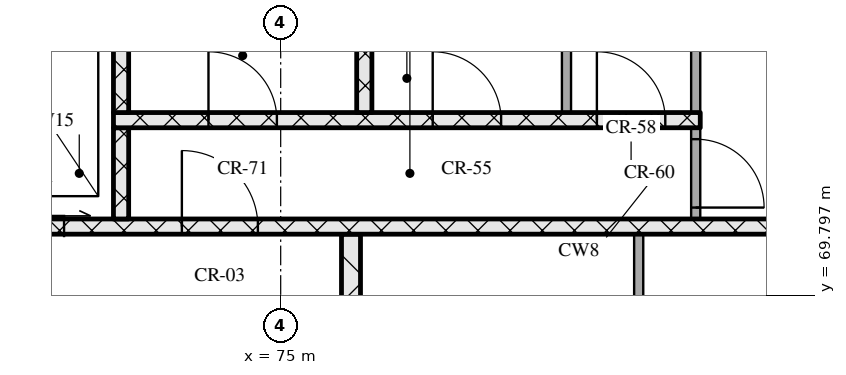
"""IFC4 building model, lengths in metres.
Left out: names, types, materials, properties, quantities, classifications, styles, units other than length and angle.
Written with IfcOpenShell. Run it as: python <this file> out.ifc"""

import sys

from ifc_helpers import new_model, si_unit, direction, frame, frame_2d, origin, place, context, subcontext, project, spatial, rectangle, extrude, element, fill, save


model = new_model("IFC4")
c1 = context("Model", 3, precision=1e-05, world=origin(), true_north=direction((0.0, 1.0)))
c2 = subcontext(c1, "Body", "Model", "MODEL_VIEW")
j1 = project(units=[si_unit("LENGTHUNIT", "METRE"), si_unit("PLANEANGLEUNIT", "RADIAN")], contexts=[c1])
p1 = place(None, origin())
s1 = spatial("IfcSite", under=j1, at=p1, CompositionType="ELEMENT")
p2 = place(p1, origin())
s2 = spatial("IfcBuilding", under=s1, at=p2, CompositionType="ELEMENT")
p3 = place(p2, frame((0.0, 0.0, 172.65)))
s3 = spatial("IfcBuildingStorey", under=s2, at=p3, CompositionType="ELEMENT", Elevation=172.65)
p4 = place(p3, frame((79.71, 68.0, 0.0), z_axis=(0.0, 0.0, 1.0), x_axis=(0.0, 1.0, 0.0)))
e1 = element("IfcWall", 1, at=p4, inside=s3, PredefinedType="PARTITIONING", context=c2, shape_type="SweptSolid", body=[
    extrude(rectangle(XDim=2.6, YDim=0.12, at=frame_2d((1.3, 0.0))), origin(), (0.0, 0.0, 1.0), 3.32),
])
p5 = place(p3, frame((75.925, 68.3, 0.0), z_axis=(0.0, 0.0, 1.0), x_axis=(0.0, 1.0, 0.0)))
e2 = element("IfcWall", 2, at=p5, inside=s3, PredefinedType="SOLIDWALL", context=c2, shape_type="SweptSolid", body=[
    extrude(rectangle(XDim=2.3, YDim=0.25, at=frame_2d((1.15, 0.0))), origin(), (0.0, 0.0, 1.0), 3.32),
])
p6 = place(p3, frame((67.8, 70.7, 0.0), z_axis=(0.0, 0.0, 1.0), x_axis=(1.0, 0.0, 0.0)))
e3 = element("IfcWall", 3, at=p6, inside=s3, PredefinedType="SOLIDWALL", context=c2, shape_type="SweptSolid", body=[
    extrude(rectangle(XDim=39.6, YDim=0.2, at=frame_2d((19.8, 0.0))), origin(), (0.0, 0.0, 1.0), 3.32),
])
p7 = place(p6, frame((0.65, 0.0, 0.0)))
e4 = element("IfcOpeningElement", 4, at=p7, cuts=e3, PredefinedType="OPENING", context=c2, shape_type="SweptSolid", body=[
    extrude(rectangle(XDim=1.1, YDim=2.1, at=frame_2d((0.55, 1.05))), frame((0.0, 0.11, 0.0), z_axis=(0.0, -1.0, 0.0), x_axis=(1.0, 0.0, 0.0)), (0.0, 0.0, 1.0), 0.22),
])
p8 = place(p6, frame((3.25, 0.0, 0.0)))
e5 = element("IfcOpeningElement", 5, at=p8, cuts=e3, PredefinedType="OPENING", context=c2, shape_type="SweptSolid", body=[
    extrude(rectangle(XDim=1.1, YDim=2.1, at=frame_2d((0.55, 1.05))), frame((0.0, 0.11, 0.0), z_axis=(0.0, -1.0, 0.0), x_axis=(1.0, 0.0, 0.0)), (0.0, 0.0, 1.0), 0.22),
])
p9 = place(p6, frame((5.9, 0.0, 0.0)))
e6 = element("IfcOpeningElement", 6, at=p9, cuts=e3, PredefinedType="OPENING", context=c2, shape_type="SweptSolid", body=[
    extrude(rectangle(XDim=1.0, YDim=2.1, at=frame_2d((0.5, 1.05))), frame((0.0, 0.11, 0.0), z_axis=(0.0, -1.0, 0.0), x_axis=(1.0, 0.0, 0.0)), (0.0, 0.0, 1.0), 0.22),
])
p10 = place(p6, frame((21.7, 0.0, 0.0)))
e7 = element("IfcOpeningElement", 7, at=p10, cuts=e3, PredefinedType="OPENING", context=c2, shape_type="SweptSolid", body=[
    extrude(rectangle(XDim=1.0, YDim=2.1, at=frame_2d((0.5, 1.05))), frame((0.0, 0.11, 0.0), z_axis=(0.0, -1.0, 0.0), x_axis=(1.0, 0.0, 0.0)), (0.0, 0.0, 1.0), 0.22),
])
p11 = place(p6, frame((32.7, 0.0, 0.0)))
e8 = element("IfcOpeningElement", 8, at=p11, cuts=e3, PredefinedType="OPENING", context=c2, shape_type="SweptSolid", body=[
    extrude(rectangle(XDim=1.0, YDim=2.1, at=frame_2d((0.5, 1.05))), frame((0.0, 0.11, 0.0), z_axis=(0.0, -1.0, 0.0), x_axis=(1.0, 0.0, 0.0)), (0.0, 0.0, 1.0), 0.22),
])
p12 = place(p6, frame((35.25, 0.0, 0.0)))
e9 = element("IfcOpeningElement", 9, at=p12, cuts=e3, PredefinedType="OPENING", context=c2, shape_type="SweptSolid", body=[
    extrude(rectangle(XDim=1.1, YDim=2.1, at=frame_2d((0.55, 1.05))), frame((0.0, 0.11, 0.0), z_axis=(0.0, -1.0, 0.0), x_axis=(1.0, 0.0, 0.0)), (0.0, 0.0, 1.0), 0.22),
])
p13 = place(p6, frame((37.85, 0.0, 0.0)))
e10 = element("IfcOpeningElement", 10, at=p13, cuts=e3, PredefinedType="OPENING", context=c2, shape_type="SweptSolid", body=[
    extrude(rectangle(XDim=1.1, YDim=2.1, at=frame_2d((0.55, 1.05))), frame((0.0, 0.11, 0.0), z_axis=(0.0, -1.0, 0.0), x_axis=(1.0, 0.0, 0.0)), (0.0, 0.0, 1.0), 0.22),
])
p14 = place(p3, frame((72.9, 70.8, 0.0), z_axis=(0.0, 0.0, 1.0), x_axis=(0.0, 1.0, 0.0)))
e11 = element("IfcWall", 11, at=p14, inside=s3, PredefinedType="SOLIDWALL", context=c2, shape_type="SweptSolid", body=[
    extrude(rectangle(XDim=1.2, YDim=0.2, at=frame_2d((0.6, 0.0))), origin(), (0.0, 0.0, 1.0), 3.32),
])
p15 = place(p3, frame((80.46, 70.8, 0.0), z_axis=(0.0, 0.0, 1.0), x_axis=(0.0, 1.0, 0.0)))
e12 = element("IfcWall", 12, at=p15, inside=s3, PredefinedType="PARTITIONING", context=c2, shape_type="SweptSolid", body=[
    extrude(rectangle(XDim=1.2, YDim=0.12, at=frame_2d((0.6, 0.0))), origin(), (0.0, 0.0, 1.0), 3.32),
])
p16 = place(p15, frame((0.15, 0.0, 0.0)))
e13 = element("IfcOpeningElement", 13, at=p16, cuts=e12, PredefinedType="OPENING", context=c2, shape_type="SweptSolid", body=[
    extrude(rectangle(XDim=0.9, YDim=2.1, at=frame_2d((0.45, 1.05))), frame((0.0, 0.07, 0.0), z_axis=(0.0, -1.0, 0.0), x_axis=(1.0, 0.0, 0.0)), (0.0, 0.0, 1.0), 0.14),
])
p17 = place(p3, frame((72.8, 72.1, 0.0), z_axis=(0.0, 0.0, 1.0), x_axis=(1.0, 0.0, 0.0)))
e14 = element("IfcWall", 14, at=p17, inside=s3, PredefinedType="SOLIDWALL", context=c2, shape_type="SweptSolid", body=[
    extrude(rectangle(XDim=7.72, YDim=0.2, at=frame_2d((3.86, 0.0))), origin(), (0.0, 0.0, 1.0), 3.32),
])
p18 = place(p17, frame((1.25, 0.0, 0.0)))
e15 = element("IfcOpeningElement", 15, at=p18, cuts=e14, PredefinedType="OPENING", context=c2, shape_type="SweptSolid", body=[
    extrude(rectangle(XDim=0.9, YDim=2.1, at=frame_2d((0.45, 1.05))), frame((0.0, 0.11, 0.0), z_axis=(0.0, -1.0, 0.0), x_axis=(1.0, 0.0, 0.0)), (0.0, 0.0, 1.0), 0.22),
])
p19 = place(p17, frame((4.2, 0.0, 0.0)))
e16 = element("IfcOpeningElement", 16, at=p19, cuts=e14, PredefinedType="OPENING", context=c2, shape_type="SweptSolid", body=[
    extrude(rectangle(XDim=0.9, YDim=2.1, at=frame_2d((0.45, 1.05))), frame((0.0, 0.11, 0.0), z_axis=(0.0, -1.0, 0.0), x_axis=(1.0, 0.0, 0.0)), (0.0, 0.0, 1.0), 0.22),
])
p20 = place(p17, frame((6.36, 0.0, 0.0)))
e17 = element("IfcOpeningElement", 17, at=p20, cuts=e14, PredefinedType="OPENING", context=c2, shape_type="SweptSolid", body=[
    extrude(rectangle(XDim=0.9, YDim=2.1, at=frame_2d((0.45, 1.05))), frame((0.0, 0.11, 0.0), z_axis=(0.0, -1.0, 0.0), x_axis=(1.0, 0.0, 0.0)), (0.0, 0.0, 1.0), 0.22),
])
for number, where, z_axis, x_axis in (
    (18, (72.9, 72.2, 0.0), (0.0, 0.0, 1.0), (0.0, 1.0, 0.0)),
    (19, (76.1, 72.2, 0.0), (0.0, 0.0, 1.0), (0.0, 1.0, 0.0)),
):
    element("IfcWall", number, at=place(p3, frame(where, z_axis=z_axis, x_axis=x_axis)), inside=s3, PredefinedType="SOLIDWALL", context=c2, shape_type="SweptSolid", body=[
        extrude(rectangle(XDim=2.2, YDim=0.2, at=frame_2d((1.1, 0.0))), origin(), (0.0, 0.0, 1.0), 3.32),
    ])
for number, where, z_axis, x_axis in (
    (20, (78.76, 72.2, 0.0), (0.0, 0.0, 1.0), (0.0, 1.0, 0.0)),
    (21, (80.46, 72.2, 0.0), (0.0, 0.0, 1.0), (0.0, 1.0, 0.0)),
):
    element("IfcWall", number, at=place(p3, frame(where, z_axis=z_axis, x_axis=x_axis)), inside=s3, PredefinedType="PARTITIONING", context=c2, shape_type="SweptSolid", body=[
        extrude(rectangle(XDim=2.2, YDim=0.12, at=frame_2d((1.1, 0.0))), origin(), (0.0, 0.0, 1.0), 3.32),
    ])
p21 = place(p8, origin())
e22 = element("IfcDoor", 22, at=p21, inside=s3, OperationType="SLIDING_TO_RIGHT", PredefinedType="DOOR", context=c2, shape_type="SweptSolid", body=[
    extrude(rectangle(XDim=1.1, YDim=2.1, at=frame_2d((0.55, 1.05))), frame((0.0, 0.025, 0.0), z_axis=(0.0, -1.0, 0.0), x_axis=(1.0, 0.0, 0.0)), (0.0, 0.0, 1.0), 0.05),
])
fill(e5, e22)
p22 = place(p9, origin())
e23 = element("IfcDoor", 23, at=p22, inside=s3, OperationType="SINGLE_SWING_LEFT", PredefinedType="DOOR", context=c2, shape_type="SweptSolid", body=[
    extrude(rectangle(XDim=1.0, YDim=2.1, at=frame_2d((0.5, 1.05))), frame((0.0, 0.025, 0.0), z_axis=(0.0, -1.0, 0.0), x_axis=(1.0, 0.0, 0.0)), (0.0, 0.0, 1.0), 0.05),
])
fill(e6, e23)
p23 = place(p16, origin())
e24 = element("IfcDoor", 24, at=p23, inside=s3, OperationType="SINGLE_SWING_RIGHT", PredefinedType="DOOR", context=c2, shape_type="SweptSolid", body=[
    extrude(rectangle(XDim=0.9, YDim=2.1, at=frame_2d((0.45, 1.05))), frame((0.0, 0.025, 0.0), z_axis=(0.0, -1.0, 0.0), x_axis=(1.0, 0.0, 0.0)), (0.0, 0.0, 1.0), 0.05),
])
fill(e13, e24)
p24 = place(p18, origin())
e25 = element("IfcDoor", 25, at=p24, inside=s3, OperationType="SINGLE_SWING_LEFT", PredefinedType="DOOR", context=c2, shape_type="SweptSolid", body=[
    extrude(rectangle(XDim=0.9, YDim=2.1, at=frame_2d((0.45, 1.05))), frame((0.0, 0.025, 0.0), z_axis=(0.0, -1.0, 0.0), x_axis=(1.0, 0.0, 0.0)), (0.0, 0.0, 1.0), 0.05),
])
fill(e15, e25)
p25 = place(p19, origin())
e26 = element("IfcDoor", 26, at=p25, inside=s3, OperationType="SINGLE_SWING_LEFT", PredefinedType="DOOR", context=c2, shape_type="SweptSolid", body=[
    extrude(rectangle(XDim=0.9, YDim=2.1, at=frame_2d((0.45, 1.05))), frame((0.0, 0.025, 0.0), z_axis=(0.0, -1.0, 0.0), x_axis=(1.0, 0.0, 0.0)), (0.0, 0.0, 1.0), 0.05),
])
fill(e16, e26)
p26 = place(p20, origin())
e27 = element("IfcDoor", 27, at=p26, inside=s3, OperationType="SINGLE_SWING_LEFT", PredefinedType="DOOR", context=c2, shape_type="SweptSolid", body=[
    extrude(rectangle(XDim=0.9, YDim=2.1, at=frame_2d((0.45, 1.05))), frame((0.0, 0.025, 0.0), z_axis=(0.0, -1.0, 0.0), x_axis=(1.0, 0.0, 0.0)), (0.0, 0.0, 1.0), 0.05),
])
fill(e17, e27)
save(model, sys.argv[1])
